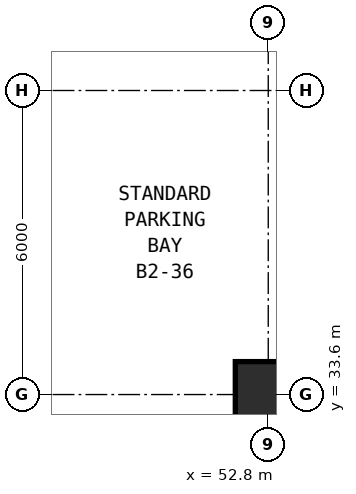
"""IFC4 building model, lengths in metres.
Left out: names, types, materials, properties, quantities, classifications, styles, units other than length and angle.
Written with IfcOpenShell. Run it as: python <this file> out.ifc"""

import sys

from ifc_helpers import new_model, si_unit, direction, frame, origin, origin_2d, place, context, subcontext, project, spatial, hollow_rectangle, extrude, element, save


model = new_model("IFC4")
c1 = context("Model", 3, precision=1e-05, world=origin(), true_north=direction((0.0, 1.0)))
c2 = subcontext(c1, "Body", "Model", "MODEL_VIEW")
j1 = project(units=[si_unit("LENGTHUNIT", "METRE"), si_unit("PLANEANGLEUNIT", "RADIAN")], contexts=[c1])
p1 = place(None, origin())
s1 = spatial("IfcSite", under=j1, at=p1, CompositionType="ELEMENT")
p2 = place(p1, origin())
s2 = spatial("IfcBuilding", under=s1, at=p2, CompositionType="ELEMENT")
p3 = place(p2, frame((0.0, 0.0, -9.6)))
s3 = spatial("IfcBuildingStorey", under=s2, at=p3, CompositionType="ELEMENT", Elevation=-9.6)
p4 = place(p3, frame((52.8, 33.6, 0.0), z_axis=(0.0, 0.0, 1.0), x_axis=(1.0, 0.0, 0.0)))
e1 = element("IfcColumn", 1, at=p4, inside=s3, PredefinedType="COLUMN", context=c2, shape_type="SweptSolid", body=[
    extrude(hollow_rectangle(XDim=1.3, YDim=1.3, WallThickness=0.048, at=origin_2d()), origin(), (0.0, 0.0, 1.0), 4.8),
])
save(model, sys.argv[1])
